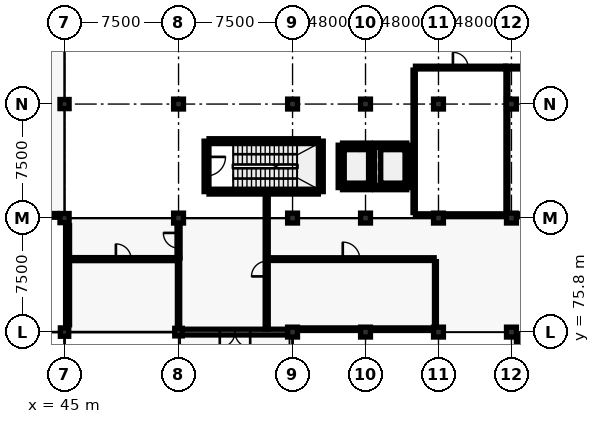
"""IFC4 building model, lengths in metres.
Left out: names, types, materials, properties, quantities, classifications, styles, units other than length and angle.
Written with IfcOpenShell. Run it as: python <this file> out.ifc"""

import sys

from ifc_helpers import new_model, si_unit, direction, frame, frame_2d, origin, origin_2d, place, context, subcontext, project, spatial, rectangle, circle, extrude, element, fill, save


model = new_model("IFC4")
c1 = context("Model", 3, precision=1e-05, world=origin(), true_north=direction((0.0, 1.0)))
c2 = subcontext(c1, "Body", "Model", "MODEL_VIEW")
j1 = project(units=[si_unit("LENGTHUNIT", "METRE"), si_unit("PLANEANGLEUNIT", "RADIAN")], contexts=[c1])
p1 = place(None, origin())
s1 = spatial("IfcSite", under=j1, at=p1, CompositionType="ELEMENT")
p2 = place(p1, origin())
s2 = spatial("IfcBuilding", under=s1, at=p2, CompositionType="ELEMENT")
p3 = place(p2, origin())
s3 = spatial("IfcBuildingStorey", under=s2, at=p3, CompositionType="ELEMENT", Elevation=0.0)
p4 = place(p3, frame((45.0, 75.8, 0.0), z_axis=(0.0, 0.0, 1.0), x_axis=(1.0, 0.0, 0.0)))
e1 = element("IfcColumn", 1, at=p4, inside=s3, PredefinedType="COLUMN", context=c2, shape_type="SweptSolid", body=[
    extrude(rectangle(XDim=0.55, YDim=0.55, at=origin_2d()), origin(), (0.0, 0.0, 1.0), 4.75),
])
for number, where, z_axis, x_axis in (
    (2, (45.0, 83.3, 0.0), (0.0, 0.0, 1.0), (1.0, 0.0, 0.0)),
    (3, (45.0, 90.8, 0.0), (0.0, 0.0, 1.0), (1.0, 0.0, 0.0)),
):
    element("IfcColumn", number, at=place(p3, frame(where, z_axis=z_axis, x_axis=x_axis)), inside=s3, PredefinedType="COLUMN", context=c2, shape_type="SweptSolid", body=[
        extrude(rectangle(XDim=0.6, YDim=0.6, at=origin_2d()), origin(), (0.0, 0.0, 1.0), 4.7),
    ])
p5 = place(p3, frame((52.5, 75.8, 0.0), z_axis=(0.0, 0.0, 1.0), x_axis=(1.0, 0.0, 0.0)))
e4 = element("IfcColumn", 4, at=p5, inside=s3, PredefinedType="COLUMN", context=c2, shape_type="SweptSolid", body=[
    extrude(rectangle(XDim=0.5, YDim=0.5, at=origin_2d()), origin(), (0.0, 0.0, 1.0), 4.7),
])
for number, where, z_axis, x_axis in (
    (5, (52.5, 83.3, 0.0), (0.0, 0.0, 1.0), (1.0, 0.0, 0.0)),
    (6, (52.5, 90.8, 0.0), (0.0, 0.0, 1.0), (1.0, 0.0, 0.0)),
):
    element("IfcColumn", number, at=place(p3, frame(where, z_axis=z_axis, x_axis=x_axis)), inside=s3, PredefinedType="COLUMN", context=c2, shape_type="SweptSolid", body=[
        extrude(rectangle(XDim=0.65, YDim=0.65, at=origin_2d()), origin(), (0.0, 0.0, 1.0), 4.7),
    ])
p6 = place(p3, frame((60.0, 75.8, 0.0), z_axis=(0.0, 0.0, 1.0), x_axis=(1.0, 0.0, 0.0)))
e7 = element("IfcColumn", 7, at=p6, inside=s3, PredefinedType="COLUMN", context=c2, shape_type="SweptSolid", body=[
    extrude(circle(Radius=0.325, at=origin_2d()), origin(), (0.0, 0.0, 1.0), 4.7),
])
for number, where, z_axis, x_axis in (
    (8, (60.0, 83.3, 0.0), (0.0, 0.0, 1.0), (1.0, 0.0, 0.0)),
    (9, (60.0, 90.8, 0.0), (0.0, 0.0, 1.0), (1.0, 0.0, 0.0)),
):
    element("IfcColumn", number, at=place(p3, frame(where, z_axis=z_axis, x_axis=x_axis)), inside=s3, PredefinedType="COLUMN", context=c2, shape_type="SweptSolid", body=[
        extrude(rectangle(XDim=0.65, YDim=0.65, at=origin_2d()), origin(), (0.0, 0.0, 1.0), 4.7),
    ])
p7 = place(p3, frame((64.8, 75.8, 0.0), z_axis=(0.0, 0.0, 1.0), x_axis=(1.0, 0.0, 0.0)))
e10 = element("IfcColumn", 10, at=p7, inside=s3, PredefinedType="COLUMN", context=c2, shape_type="SweptSolid", body=[
    extrude(circle(Radius=0.325, at=origin_2d()), origin(), (0.0, 0.0, 1.0), 4.7),
])
for number, where, z_axis, x_axis in (
    (11, (64.8, 83.3, 0.0), (0.0, 0.0, 1.0), (1.0, 0.0, 0.0)),
    (12, (64.8, 90.8, 0.0), (0.0, 0.0, 1.0), (1.0, 0.0, 0.0)),
):
    element("IfcColumn", number, at=place(p3, frame(where, z_axis=z_axis, x_axis=x_axis)), inside=s3, PredefinedType="COLUMN", context=c2, shape_type="SweptSolid", body=[
        extrude(rectangle(XDim=0.65, YDim=0.65, at=origin_2d()), origin(), (0.0, 0.0, 1.0), 4.7),
    ])
p8 = place(p3, frame((69.6, 75.8, 0.0), z_axis=(0.0, 0.0, 1.0), x_axis=(1.0, 0.0, 0.0)))
e13 = element("IfcColumn", 13, at=p8, inside=s3, PredefinedType="COLUMN", context=c2, shape_type="SweptSolid", body=[
    extrude(circle(Radius=0.325, at=origin_2d()), origin(), (0.0, 0.0, 1.0), 4.7),
])
for number, where, z_axis, x_axis in (
    (14, (69.6, 83.3, 0.0), (0.0, 0.0, 1.0), (1.0, 0.0, 0.0)),
    (15, (69.6, 90.8, 0.0), (0.0, 0.0, 1.0), (1.0, 0.0, 0.0)),
):
    element("IfcColumn", number, at=place(p3, frame(where, z_axis=z_axis, x_axis=x_axis)), inside=s3, PredefinedType="COLUMN", context=c2, shape_type="SweptSolid", body=[
        extrude(rectangle(XDim=0.65, YDim=0.65, at=origin_2d()), origin(), (0.0, 0.0, 1.0), 4.7),
    ])
p9 = place(p3, frame((74.4, 75.8, 0.0), z_axis=(0.0, 0.0, 1.0), x_axis=(1.0, 0.0, 0.0)))
e16 = element("IfcColumn", 16, at=p9, inside=s3, PredefinedType="COLUMN", context=c2, shape_type="SweptSolid", body=[
    extrude(circle(Radius=0.325, at=origin_2d()), origin(), (0.0, 0.0, 1.0), 4.7),
])
for number, where, z_axis, x_axis in (
    (17, (74.4, 83.3, 0.0), (0.0, 0.0, 1.0), (1.0, 0.0, 0.0)),
    (18, (74.4, 90.8, 0.0), (0.0, 0.0, 1.0), (1.0, 0.0, 0.0)),
):
    element("IfcColumn", number, at=place(p3, frame(where, z_axis=z_axis, x_axis=x_axis)), inside=s3, PredefinedType="COLUMN", context=c2, shape_type="SweptSolid", body=[
        extrude(rectangle(XDim=0.65, YDim=0.65, at=origin_2d()), origin(), (0.0, 0.0, 1.0), 4.7),
    ])
p10 = place(p3, frame((59.675, 75.8, 0.0), z_axis=(0.0, 0.0, 1.0), x_axis=(-1.0, 0.0, 0.0)))
e19 = element("IfcWall", 19, at=p10, inside=s3, PredefinedType="SOLIDWALL", context=c2, shape_type="SweptSolid", body=[
    extrude(rectangle(XDim=6.925, YDim=0.38, at=frame_2d((3.462, 0.0))), origin(), (0.0, 0.0, 1.0), 4.035),
])
p11 = place(p10, frame((2.462, 0.0, 0.0)))
e20 = element("IfcOpeningElement", 20, at=p11, cuts=e19, PredefinedType="OPENING", context=c2, shape_type="SweptSolid", body=[
    extrude(rectangle(XDim=2.0, YDim=2.35, at=frame_2d((1.0, 1.175))), frame((0.0, 0.202, 0.0), z_axis=(0.0, -1.0, 0.0), x_axis=(1.0, 0.0, 0.0)), (0.0, 0.0, 1.0), 0.404),
])
p12 = place(p3, frame((44.5, 83.48, 4.9), z_axis=(0.0, 0.0, 1.0), x_axis=(-1.0, 0.0, 0.0)))
e21 = element("IfcWall", 21, at=p12, inside=s3, PredefinedType="PARAPET", context=c2, shape_type="SweptSolid", body=[
    extrude(rectangle(XDim=6.52, YDim=0.24, at=frame_2d((3.26, 0.0))), origin(), (0.0, 0.0, 1.0), 0.6),
])
p13 = place(p3, frame((45.2, 76.28, 4.9), z_axis=(0.0, 0.0, 1.0), x_axis=(0.0, 1.0, 0.0)))
e22 = element("IfcWall", 22, at=p13, inside=s3, PredefinedType="PARAPET", context=c2, shape_type="SweptSolid", body=[
    extrude(rectangle(XDim=6.52, YDim=0.26, at=frame_2d((3.26, 0.0))), origin(), (0.0, 0.0, 1.0), 0.6),
])
p14 = place(p3, frame((54.505, 85.04, 0.0), z_axis=(0.0, 0.0, 1.0), x_axis=(1.0, 0.0, 0.0)))
e23 = element("IfcWall", 23, at=p14, inside=s3, PredefinedType="SHEAR", context=c2, shape_type="SweptSolid", body=[
    extrude(rectangle(XDim=7.19, YDim=0.32, at=frame_2d((3.595, 0.0))), origin(), (0.0, 0.0, 1.0), 4.7),
])
p15 = place(p3, frame((61.86, 85.04, 0.0), z_axis=(0.0, 0.0, 1.0), x_axis=(0.0, 1.0, 0.0)))
e24 = element("IfcWall", 24, at=p15, inside=s3, PredefinedType="SHEAR", context=c2, shape_type="SweptSolid", body=[
    extrude(rectangle(XDim=3.32, YDim=0.32, at=frame_2d((1.66, 0.0))), origin(), (0.0, 0.0, 1.0), 4.7),
])
p16 = place(p3, frame((61.695, 88.36, 0.0), z_axis=(0.0, 0.0, 1.0), x_axis=(-1.0, 0.0, 0.0)))
e25 = element("IfcWall", 25, at=p16, inside=s3, PredefinedType="SHEAR", context=c2, shape_type="SweptSolid", body=[
    extrude(rectangle(XDim=7.19, YDim=0.32, at=frame_2d((3.595, 0.0))), origin(), (0.0, 0.0, 1.0), 4.7),
])
p17 = place(p3, frame((54.34, 88.36, 0.0), z_axis=(0.0, 0.0, 1.0), x_axis=(0.0, -1.0, 0.0)))
e26 = element("IfcWall", 26, at=p17, inside=s3, PredefinedType="SHEAR", context=c2, shape_type="SweptSolid", body=[
    extrude(rectangle(XDim=3.32, YDim=0.32, at=frame_2d((1.66, 0.0))), origin(), (0.0, 0.0, 1.0), 4.7),
])
p18 = place(p17, frame((1.035, 0.0, 0.0)))
e27 = element("IfcOpeningElement", 27, at=p18, cuts=e26, PredefinedType="OPENING", context=c2, shape_type="SweptSolid", body=[
    extrude(rectangle(XDim=1.25, YDim=2.2, at=frame_2d((0.625, 1.1))), frame((0.0, 0.172, 0.0), z_axis=(0.0, -1.0, 0.0), x_axis=(1.0, 0.0, 0.0)), (0.0, 0.0, 1.0), 0.344),
])
p19 = place(p3, frame((63.286, 85.307, 0.0), z_axis=(0.0, 0.0, 1.0), x_axis=(1.0, 0.0, 0.0)))
e28 = element("IfcWall", 28, at=p19, inside=s3, PredefinedType="SHEAR", context=c2, shape_type="SweptSolid", body=[
    extrude(rectangle(XDim=1.828, YDim=0.28, at=frame_2d((0.914, 0.0))), origin(), (0.0, 0.0, 1.0), 4.7),
])
p20 = place(p3, frame((65.259, 85.307, 0.0), z_axis=(0.0, 0.0, 1.0), x_axis=(0.0, 1.0, 0.0)))
e29 = element("IfcWall", 29, at=p20, inside=s3, PredefinedType="SHEAR", context=c2, shape_type="SweptSolid", body=[
    extrude(rectangle(XDim=2.787, YDim=0.28, at=frame_2d((1.393, 0.0))), origin(), (0.0, 0.0, 1.0), 4.7),
])
p21 = place(p3, frame((65.114, 88.093, 0.0), z_axis=(0.0, 0.0, 1.0), x_axis=(-1.0, 0.0, 0.0)))
e30 = element("IfcWall", 30, at=p21, inside=s3, PredefinedType="SHEAR", context=c2, shape_type="SweptSolid", body=[
    extrude(rectangle(XDim=1.828, YDim=0.28, at=frame_2d((0.914, 0.0))), origin(), (0.0, 0.0, 1.0), 4.7),
])
p22 = place(p21, frame((0.314, 0.0, 0.0)))
e31 = element("IfcOpeningElement", 31, at=p22, cuts=e30, PredefinedType="OPENING", context=c2, shape_type="SweptSolid", body=[
    extrude(rectangle(XDim=1.2, YDim=2.15, at=frame_2d((0.6, 1.075))), frame((0.0, 0.152, 0.0), z_axis=(0.0, -1.0, 0.0), x_axis=(1.0, 0.0, 0.0)), (0.0, 0.0, 1.0), 0.304),
])
p23 = place(p3, frame((63.141, 88.093, 0.0), z_axis=(0.0, 0.0, 1.0), x_axis=(0.0, -1.0, 0.0)))
e32 = element("IfcWall", 32, at=p23, inside=s3, PredefinedType="SHEAR", context=c2, shape_type="SweptSolid", body=[
    extrude(rectangle(XDim=2.787, YDim=0.28, at=frame_2d((1.393, 0.0))), origin(), (0.0, 0.0, 1.0), 4.7),
])
p24 = place(p3, frame((65.404, 85.307, 0.0), z_axis=(0.0, 0.0, 1.0), x_axis=(1.0, 0.0, 0.0)))
e33 = element("IfcWall", 33, at=p24, inside=s3, PredefinedType="SHEAR", context=c2, shape_type="SweptSolid", body=[
    extrude(rectangle(XDim=2.11, YDim=0.28, at=frame_2d((1.055, 0.0))), origin(), (0.0, 0.0, 1.0), 4.7),
])
p25 = place(p3, frame((67.659, 85.307, 0.0), z_axis=(0.0, 0.0, 1.0), x_axis=(0.0, 1.0, 0.0)))
e34 = element("IfcWall", 34, at=p25, inside=s3, PredefinedType="SHEAR", context=c2, shape_type="SweptSolid", body=[
    extrude(rectangle(XDim=2.787, YDim=0.28, at=frame_2d((1.393, 0.0))), origin(), (0.0, 0.0, 1.0), 4.7),
])
p26 = place(p3, frame((67.514, 88.093, 0.0), z_axis=(0.0, 0.0, 1.0), x_axis=(-1.0, 0.0, 0.0)))
e35 = element("IfcWall", 35, at=p26, inside=s3, PredefinedType="SHEAR", context=c2, shape_type="SweptSolid", body=[
    extrude(rectangle(XDim=2.11, YDim=0.28, at=frame_2d((1.055, 0.0))), origin(), (0.0, 0.0, 1.0), 4.7),
])
p27 = place(p26, frame((0.455, 0.0, 0.0)))
e36 = element("IfcOpeningElement", 36, at=p27, cuts=e35, PredefinedType="OPENING", context=c2, shape_type="SweptSolid", body=[
    extrude(rectangle(XDim=1.2, YDim=2.15, at=frame_2d((0.6, 1.075))), frame((0.0, 0.152, 0.0), z_axis=(0.0, -1.0, 0.0), x_axis=(1.0, 0.0, 0.0)), (0.0, 0.0, 1.0), 0.304),
])
p28 = place(p3, frame((68.085, 93.2, 0.0), z_axis=(0.0, 0.0, 1.0), x_axis=(1.0, 0.0, 0.0)))
e37 = element("IfcWall", 37, at=p28, inside=s3, PredefinedType="PARTITIONING", context=c2, shape_type="SweptSolid", body=[
    extrude(rectangle(XDim=5.93, YDim=0.18, at=frame_2d((2.965, 0.0))), origin(), (0.0, 0.0, 1.0), 3.985),
])
p29 = place(p28, frame((2.465, 0.0, 0.0)))
e38 = element("IfcOpeningElement", 38, at=p29, cuts=e37, PredefinedType="OPENING", context=c2, shape_type="SweptSolid", body=[
    extrude(rectangle(XDim=1.0, YDim=2.15, at=frame_2d((0.5, 1.075))), frame((0.0, 0.102, 0.0), z_axis=(0.0, -1.0, 0.0), x_axis=(1.0, 0.0, 0.0)), (0.0, 0.0, 1.0), 0.204),
])
p30 = place(p3, frame((74.027, 93.2, 0.0), z_axis=(0.0, 0.0, 1.0), x_axis=(1.0, 0.0, 0.0)))
e39 = element("IfcWall", 39, at=p30, inside=s3, PredefinedType="PARTITIONING", context=c2, shape_type="SweptSolid", body=[
    extrude(rectangle(XDim=6.088, YDim=0.18, at=frame_2d((3.044, 0.0))), origin(), (0.0, 0.0, 1.0), 3.985),
])
p31 = place(p30, frame((2.972, 0.0, 0.0)))
e40 = element("IfcOpeningElement", 40, at=p31, cuts=e39, PredefinedType="OPENING", context=c2, shape_type="SweptSolid", body=[
    extrude(rectangle(XDim=1.05, YDim=2.15, at=frame_2d((0.525, 1.075))), frame((0.0, 0.102, 0.0), z_axis=(0.0, -1.0, 0.0), x_axis=(1.0, 0.0, 0.0)), (0.0, 0.0, 1.0), 0.204),
])
p32 = place(p3, frame((52.5, 80.685, 0.0), z_axis=(0.0, 0.0, 1.0), x_axis=(0.0, 1.0, 0.0)))
e41 = element("IfcWall", 41, at=p32, inside=s3, PredefinedType="PARTITIONING", context=c2, shape_type="SweptSolid", body=[
    extrude(rectangle(XDim=2.278, YDim=0.2, at=frame_2d((1.139, 0.0))), origin(), (0.0, 0.0, 1.0), 4.7),
])
p33 = place(p32, frame((0.639, 0.0, 0.0)))
e42 = element("IfcOpeningElement", 42, at=p33, cuts=e41, PredefinedType="OPENING", context=c2, shape_type="SweptSolid", body=[
    extrude(rectangle(XDim=1.0, YDim=2.15, at=frame_2d((0.5, 1.075))), frame((0.0, 0.112, 0.0), z_axis=(0.0, -1.0, 0.0), x_axis=(1.0, 0.0, 0.0)), (0.0, 0.0, 1.0), 0.224),
])
p34 = place(p3, frame((58.3, 76.002, 0.0), z_axis=(0.0, 0.0, 1.0), x_axis=(0.0, 1.0, 0.0)))
e43 = element("IfcWall", 43, at=p34, inside=s3, PredefinedType="PARTITIONING", context=c2, shape_type="SweptSolid", body=[
    extrude(rectangle(XDim=8.866, YDim=0.2, at=frame_2d((4.433, 0.0))), origin(), (0.0, 0.0, 1.0), 4.035),
])
p35 = place(p34, frame((3.461, 0.0, 0.0)))
e44 = element("IfcOpeningElement", 44, at=p35, cuts=e43, PredefinedType="OPENING", context=c2, shape_type="SweptSolid", body=[
    extrude(rectangle(XDim=1.0, YDim=2.15, at=frame_2d((0.5, 1.075))), frame((0.0, 0.112, 0.0), z_axis=(0.0, -1.0, 0.0), x_axis=(1.0, 0.0, 0.0)), (0.0, 0.0, 1.0), 0.224),
])
p36 = place(p3, frame((45.342, 80.6, 0.0), z_axis=(0.0, 0.0, 1.0), x_axis=(1.0, 0.0, 0.0)))
e45 = element("IfcWall", 45, at=p36, inside=s3, PredefinedType="PARTITIONING", context=c2, shape_type="SweptSolid", body=[
    extrude(rectangle(XDim=7.073, YDim=0.2, at=frame_2d((3.537, 0.0))), origin(), (0.0, 0.0, 1.0), 4.7),
])
p37 = place(p36, frame((3.037, 0.0, 0.0)))
e46 = element("IfcOpeningElement", 46, at=p37, cuts=e45, PredefinedType="OPENING", context=c2, shape_type="SweptSolid", body=[
    extrude(rectangle(XDim=1.0, YDim=2.15, at=frame_2d((0.5, 1.075))), frame((0.0, 0.112, 0.0), z_axis=(0.0, -1.0, 0.0), x_axis=(1.0, 0.0, 0.0)), (0.0, 0.0, 1.0), 0.224),
])
p38 = place(p3, frame((58.412, 80.6, 0.0), z_axis=(0.0, 0.0, 1.0), x_axis=(1.0, 0.0, 0.0)))
e47 = element("IfcWall", 47, at=p38, inside=s3, PredefinedType="PARTITIONING", context=c2, shape_type="SweptSolid", body=[
    extrude(rectangle(XDim=10.903, YDim=0.18, at=frame_2d((5.451, 0.0))), origin(), (0.0, 0.0, 1.0), 4.7),
])
p39 = place(p38, frame((4.892, 0.0, 0.0)))
e48 = element("IfcOpeningElement", 48, at=p39, cuts=e47, PredefinedType="OPENING", context=c2, shape_type="SweptSolid", body=[
    extrude(rectangle(XDim=1.12, YDim=2.2, at=frame_2d((0.56, 1.1))), frame((0.0, 0.102, 0.0), z_axis=(0.0, -1.0, 0.0), x_axis=(1.0, 0.0, 0.0)), (0.0, 0.0, 1.0), 0.204),
])
p40 = place(p3, frame((74.668, 75.6, 0.0), z_axis=(0.0, 0.0, 1.0), x_axis=(1.0, 0.0, 0.0)))
e49 = element("IfcWall", 49, at=p40, inside=s3, PredefinedType="PARTITIONING", context=c2, shape_type="SweptSolid", body=[
    extrude(rectangle(XDim=9.064, YDim=0.15, at=frame_2d((4.532, 0.0))), origin(), (0.0, 0.0, 1.0), 3.985),
])
p41 = place(p3, frame((68.085, 83.5, 0.0), z_axis=(0.0, 0.0, 1.0), x_axis=(1.0, 0.0, 0.0)))
e50 = element("IfcWall", 50, at=p41, inside=s3, PredefinedType="PARTITIONING", context=c2, shape_type="SweptSolid", body=[
    extrude(rectangle(XDim=5.978, YDim=0.16, at=frame_2d((2.989, 0.0))), origin(), (0.0, 0.0, 1.0), 3.985),
])
p42 = place(p3, frame((74.555, 83.5, 0.0), z_axis=(0.0, 0.0, 1.0), x_axis=(1.0, 0.0, 0.0)))
e51 = element("IfcWall", 51, at=p42, inside=s3, PredefinedType="PARTITIONING", context=c2, shape_type="SweptSolid", body=[
    extrude(rectangle(XDim=5.56, YDim=0.15, at=frame_2d((2.78, 0.0))), origin(), (0.0, 0.0, 1.0), 3.985),
])
p43 = place(p3, frame((60.06, 76.0, 0.0), z_axis=(0.0, 0.0, 1.0), x_axis=(1.0, 0.0, 0.0)))
e52 = element("IfcWall", 52, at=p43, inside=s3, PredefinedType="PARTITIONING", context=c2, shape_type="SweptSolid", body=[
    extrude(rectangle(XDim=9.272, YDim=0.15, at=frame_2d((4.636, 0.0))), origin(), (0.0, 0.0, 1.0), 4.035),
])
p44 = place(p3, frame((74.8, 68.092, 0.0), z_axis=(0.0, 0.0, 1.0), x_axis=(0.0, 1.0, 0.0)))
e53 = element("IfcWall", 53, at=p44, inside=s3, PredefinedType="PARTITIONING", context=c2, shape_type="SweptSolid", body=[
    extrude(rectangle(XDim=7.421, YDim=0.15, at=frame_2d((3.71, 0.0))), origin(), (0.0, 0.0, 1.0), 3.985),
])
p45 = place(p3, frame((68.0, 83.665, 0.0), z_axis=(0.0, 0.0, 1.0), x_axis=(0.0, 1.0, 0.0)))
e54 = element("IfcWall", 54, at=p45, inside=s3, PredefinedType="PARTITIONING", context=c2, shape_type="SweptSolid", body=[
    extrude(rectangle(XDim=9.37, YDim=0.15, at=frame_2d((4.685, 0.0))), origin(), (0.0, 0.0, 1.0), 4.035),
])
p46 = place(p3, frame((74.1, 83.637, 0.0), z_axis=(0.0, 0.0, 1.0), x_axis=(0.0, 1.0, 0.0)))
e55 = element("IfcWall", 55, at=p46, inside=s3, PredefinedType="PARTITIONING", context=c2, shape_type="SweptSolid", body=[
    extrude(rectangle(XDim=9.461, YDim=0.125, at=frame_2d((4.73, 0.0))), origin(), (0.0, 0.0, 1.0), 3.985),
])
p47 = place(p3, frame((52.5, 76.062, 0.0), z_axis=(0.0, 0.0, 1.0), x_axis=(0.0, 1.0, 0.0)))
e56 = element("IfcWall", 56, at=p47, inside=s3, PredefinedType="PARTITIONING", context=c2, shape_type="SweptSolid", body=[
    extrude(rectangle(XDim=4.611, YDim=0.15, at=frame_2d((2.306, 0.0))), origin(), (0.0, 0.0, 1.0), 4.7),
])
p48 = place(p3, frame((69.4, 76.068, 0.0), z_axis=(0.0, 0.0, 1.0), x_axis=(0.0, 1.0, 0.0)))
e57 = element("IfcWall", 57, at=p48, inside=s3, PredefinedType="PARTITIONING", context=c2, shape_type="SweptSolid", body=[
    extrude(rectangle(XDim=4.367, YDim=0.125, at=frame_2d((2.184, 0.0))), origin(), (0.0, 0.0, 1.0), 4.035),
])
p49 = place(p11, origin())
e58 = element("IfcDoor", 58, at=p49, inside=s3, OperationType="DOUBLE_DOOR_SINGLE_SWING", PredefinedType="DOOR", context=c2, shape_type="SweptSolid", body=[
    extrude(rectangle(XDim=2.0, YDim=2.35, at=frame_2d((1.0, 1.175))), frame((0.0, 0.025, 0.0), z_axis=(0.0, -1.0, 0.0), x_axis=(1.0, 0.0, 0.0)), (0.0, 0.0, 1.0), 0.05),
])
fill(e20, e58)
p50 = place(p18, origin())
e59 = element("IfcDoor", 59, at=p50, inside=s3, OperationType="SINGLE_SWING_LEFT", PredefinedType="DOOR", context=c2, shape_type="SweptSolid", body=[
    extrude(rectangle(XDim=1.25, YDim=2.2, at=frame_2d((0.625, 1.1))), frame((0.0, 0.025, 0.0), z_axis=(0.0, -1.0, 0.0), x_axis=(1.0, 0.0, 0.0)), (0.0, 0.0, 1.0), 0.05),
])
fill(e27, e59)
p51 = place(p22, origin())
e60 = element("IfcDoor", 60, at=p51, inside=s3, OperationType="SLIDING_TO_LEFT", PredefinedType="DOOR", context=c2, shape_type="SweptSolid", body=[
    extrude(rectangle(XDim=1.2, YDim=2.15, at=frame_2d((0.6, 1.075))), frame((0.0, 0.025, 0.0), z_axis=(0.0, -1.0, 0.0), x_axis=(1.0, 0.0, 0.0)), (0.0, 0.0, 1.0), 0.05),
])
fill(e31, e60)
p52 = place(p27, origin())
e61 = element("IfcDoor", 61, at=p52, inside=s3, OperationType="SLIDING_TO_RIGHT", PredefinedType="DOOR", context=c2, shape_type="SweptSolid", body=[
    extrude(rectangle(XDim=1.2, YDim=2.15, at=frame_2d((0.6, 1.075))), frame((0.0, 0.025, 0.0), z_axis=(0.0, -1.0, 0.0), x_axis=(1.0, 0.0, 0.0)), (0.0, 0.0, 1.0), 0.05),
])
fill(e36, e61)
p53 = place(p29, origin())
e62 = element("IfcDoor", 62, at=p53, inside=s3, OperationType="SINGLE_SWING_LEFT", PredefinedType="DOOR", context=c2, shape_type="SweptSolid", body=[
    extrude(rectangle(XDim=1.0, YDim=2.15, at=frame_2d((0.5, 1.075))), frame((0.0, 0.025, 0.0), z_axis=(0.0, -1.0, 0.0), x_axis=(1.0, 0.0, 0.0)), (0.0, 0.0, 1.0), 0.05),
])
fill(e38, e62)
p54 = place(p33, origin())
e63 = element("IfcDoor", 63, at=p54, inside=s3, OperationType="SINGLE_SWING_RIGHT", PredefinedType="DOOR", context=c2, shape_type="SweptSolid", body=[
    extrude(rectangle(XDim=1.0, YDim=2.15, at=frame_2d((0.5, 1.075))), frame((0.0, 0.025, 0.0), z_axis=(0.0, -1.0, 0.0), x_axis=(1.0, 0.0, 0.0)), (0.0, 0.0, 1.0), 0.05),
])
fill(e42, e63)
p55 = place(p35, origin())
e64 = element("IfcDoor", 64, at=p55, inside=s3, OperationType="SINGLE_SWING_LEFT", PredefinedType="DOOR", context=c2, shape_type="SweptSolid", body=[
    extrude(rectangle(XDim=1.0, YDim=2.15, at=frame_2d((0.5, 1.075))), frame((0.0, 0.025, 0.0), z_axis=(0.0, -1.0, 0.0), x_axis=(1.0, 0.0, 0.0)), (0.0, 0.0, 1.0), 0.05),
])
fill(e44, e64)
p56 = place(p37, origin())
e65 = element("IfcDoor", 65, at=p56, inside=s3, OperationType="SINGLE_SWING_LEFT", PredefinedType="DOOR", context=c2, shape_type="SweptSolid", body=[
    extrude(rectangle(XDim=1.0, YDim=2.15, at=frame_2d((0.5, 1.075))), frame((0.0, 0.025, 0.0), z_axis=(0.0, -1.0, 0.0), x_axis=(1.0, 0.0, 0.0)), (0.0, 0.0, 1.0), 0.05),
])
fill(e46, e65)
p57 = place(p39, origin())
e66 = element("IfcDoor", 66, at=p57, inside=s3, OperationType="SINGLE_SWING_LEFT", PredefinedType="DOOR", context=c2, shape_type="SweptSolid", body=[
    extrude(rectangle(XDim=1.12, YDim=2.2, at=frame_2d((0.56, 1.1))), frame((0.0, 0.025, 0.0), z_axis=(0.0, -1.0, 0.0), x_axis=(1.0, 0.0, 0.0)), (0.0, 0.0, 1.0), 0.05),
])
fill(e48, e66)
save(model, sys.argv[1])
